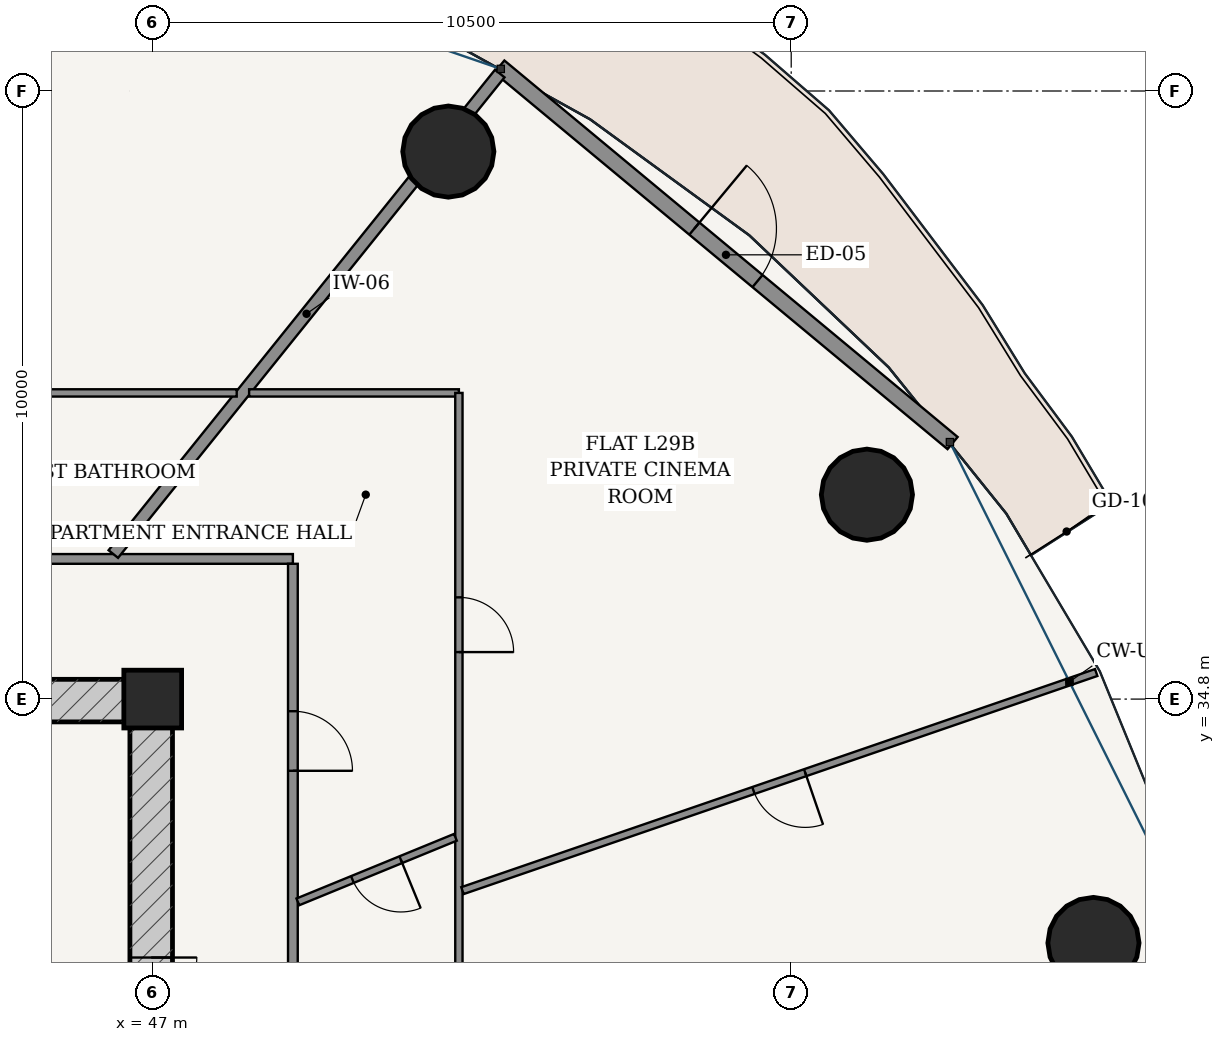
"""IFC4 building model, lengths in metres.
Left out: names, types, materials, properties, quantities, classifications, styles, units other than length and angle.
Written with IfcOpenShell. Run it as: python <this file> out.ifc"""

import sys

from ifc_helpers import new_model, si_unit, direction, frame, frame_2d, origin, origin_2d, place, context, subcontext, project, spatial, rectangle, hollow_circle, extrude, source, transform, mapped, element, fill, save


model = new_model("IFC4")
c1 = context("Model", 3, precision=1e-05, world=origin(), true_north=direction((-0.2419218956, 0.970295726276)))
c2 = subcontext(c1, "Body", "Model", "MODEL_VIEW")
j1 = project(units=[si_unit("LENGTHUNIT", "METRE"), si_unit("PLANEANGLEUNIT", "RADIAN")], contexts=[c1])
p1 = place(None, origin())
s1 = spatial("IfcSite", under=j1, at=p1, CompositionType="ELEMENT")
p2 = place(p1, origin())
s2 = spatial("IfcBuilding", under=s1, at=p2, CompositionType="ELEMENT")
p3 = place(p2, frame((0.0, 0.0, 112.2)))
s3 = spatial("IfcBuildingStorey", under=s2, at=p3, CompositionType="ELEMENT", Elevation=112.2)
p4 = place(p3, frame((47.0, 34.8, 0.0), z_axis=(0.0, 0.0, 1.0), x_axis=(1.0, 0.0, 0.0)))
e1 = element("IfcColumn", 1, at=p4, inside=s3, PredefinedType="COLUMN", context=c2, shape_type="SweptSolid", body=[
    extrude(rectangle(XDim=0.95, YDim=0.95, at=origin_2d()), origin(), (0.0, 0.0, 1.0), 3.6),
])
p5 = place(p3, frame((28.675, 34.775, 0.0), z_axis=(0.0, 0.0, 1.0), x_axis=(1.0, 0.0, 0.0)))
e2 = element("IfcWall", 2, at=p5, inside=s3, PredefinedType="SHEAR", context=c2, shape_type="SweptSolid", body=[
    extrude(rectangle(XDim=18.65, YDim=0.7, at=frame_2d((9.325, 0.0))), origin(), (0.0, 0.0, 1.0), 3.325),
])
p6 = place(p5, frame((6.837, 0.0, 0.0)))
e3 = element("IfcOpeningElement", 3, at=p6, cuts=e2, PredefinedType="OPENING", context=c2, shape_type="SweptSolid", body=[
    extrude(rectangle(XDim=0.85, YDim=2.1, at=frame_2d((0.425, 1.05))), frame((0.0, 0.36, 0.0), z_axis=(0.0, -1.0, 0.0), x_axis=(1.0, 0.0, 0.0)), (0.0, 0.0, 1.0), 0.72),
])
p7 = place(p5, frame((8.895, 0.0, 0.0)))
e4 = element("IfcOpeningElement", 4, at=p7, cuts=e2, PredefinedType="OPENING", context=c2, shape_type="SweptSolid", body=[
    extrude(rectangle(XDim=0.86, YDim=2.1, at=frame_2d((0.43, 1.05))), frame((0.0, 0.36, 0.0), z_axis=(0.0, -1.0, 0.0), x_axis=(1.0, 0.0, 0.0)), (0.0, 0.0, 1.0), 0.72),
])
p8 = place(p5, frame((10.962, 0.0, 0.0)))
e5 = element("IfcOpeningElement", 5, at=p8, cuts=e2, PredefinedType="OPENING", context=c2, shape_type="SweptSolid", body=[
    extrude(rectangle(XDim=0.85, YDim=2.1, at=frame_2d((0.425, 1.05))), frame((0.0, 0.36, 0.0), z_axis=(0.0, -1.0, 0.0), x_axis=(1.0, 0.0, 0.0)), (0.0, 0.0, 1.0), 0.72),
])
p9 = place(p3, frame((46.975, 19.175, 0.0), z_axis=(0.0, 0.0, 1.0), x_axis=(0.0, 1.0, 0.0)))
e6 = element("IfcWall", 6, at=p9, inside=s3, PredefinedType="SHEAR", context=c2, shape_type="SweptSolid", body=[
    extrude(rectangle(XDim=15.25, YDim=0.7, at=frame_2d((7.625, 0.0))), origin(), (0.0, 0.0, 1.0), 3.325),
])
p10 = place(p9, frame((9.875, 0.0, 0.0)))
e7 = element("IfcOpeningElement", 7, at=p10, cuts=e6, PredefinedType="OPENING", context=c2, shape_type="SweptSolid", body=[
    extrude(rectangle(XDim=1.5, YDim=2.2, at=frame_2d((0.75, 1.1))), frame((0.0, 0.36, 0.0), z_axis=(0.0, -1.0, 0.0), x_axis=(1.0, 0.0, 0.0)), (0.0, 0.0, 1.0), 0.72),
])
for number, where, z_axis, x_axis in (
    (8, (62.471, 30.79, 0.0), (0.0, 0.0, 1.0), (1.0, 0.0, 0.0)),
    (9, (58.745, 38.161, 0.0), (0.0, 0.0, 1.0), (1.0, 0.0, 0.0)),
    (10, (51.862, 43.803, 0.0), (0.0, 0.0, 1.0), (1.0, 0.0, 0.0)),
):
    element("IfcColumn", number, at=place(p3, frame(where, z_axis=z_axis, x_axis=x_axis)), inside=s3, PredefinedType="COLUMN", context=c2, shape_type="SweptSolid", body=[
        extrude(hollow_circle(Radius=0.75, WallThickness=0.045, at=origin_2d()), origin(), (0.0, 0.0, 1.0), 3.6),
    ])
p11 = place(p3, frame((60.154, 39.01, 0.0), z_axis=(0.0, 0.0, 1.0), x_axis=(-0.769242574941, 0.638956853706, 0.0)))
e11 = element("IfcWall", 11, at=p11, inside=s3, PredefinedType="SOLIDWALL", context=c2, shape_type="SweptSolid", body=[
    extrude(rectangle(XDim=9.69, YDim=0.26, at=frame_2d((4.845, 0.0))), origin(), (0.0, 0.0, 1.0), 3.325),
])
p12 = place(p11, frame((4.17, 0.0, 0.0)))
e12 = element("IfcOpeningElement", 12, at=p12, cuts=e11, PredefinedType="OPENING", context=c2, shape_type="SweptSolid", body=[
    extrude(rectangle(XDim=1.35, YDim=2.2, at=frame_2d((0.675, 1.1))), frame((0.0, 0.14, 0.0), z_axis=(0.0, -1.0, 0.0), x_axis=(1.0, 0.0, 0.0)), (0.0, 0.0, 1.0), 0.28),
])
p13 = place(p3, frame((26.695, 37.105, 0.0), z_axis=(0.0, 0.0, 1.0), x_axis=(1.0, 0.0, 0.0)))
e13 = element("IfcWall", 13, at=p13, inside=s3, PredefinedType="PARTITIONING", context=c2, shape_type="SweptSolid", body=[
    extrude(rectangle(XDim=22.61, YDim=0.16, at=frame_2d((11.305, 0.0))), origin(), (0.0, 0.0, 1.0), 2.767),
])
p14 = place(p3, frame((49.305, 16.575, 0.0), z_axis=(0.0, 0.0, 1.0), x_axis=(0.0, 1.0, 0.0)))
e14 = element("IfcWall", 14, at=p14, inside=s3, PredefinedType="PARTITIONING", context=c2, shape_type="SweptSolid", body=[
    extrude(rectangle(XDim=20.45, YDim=0.16, at=frame_2d((10.225, 0.0))), origin(), (0.0, 0.0, 1.0), 2.767),
])
p15 = place(p14, frame((17.046, 0.0, 0.0)))
e15 = element("IfcOpeningElement", 15, at=p15, cuts=e14, PredefinedType="OPENING", context=c2, shape_type="SweptSolid", body=[
    extrude(rectangle(XDim=0.98, YDim=2.2, at=frame_2d((0.49, 1.1))), frame((0.0, 0.09, 0.0), z_axis=(0.0, -1.0, 0.0), x_axis=(1.0, 0.0, 0.0)), (0.0, 0.0, 1.0), 0.18),
])
p16 = place(p3, frame((46.352, 37.185, 0.0), z_axis=(0.0, 0.0, 1.0), x_axis=(0.626712884514, 0.779250255299, 0.0)))
e16 = element("IfcWall", 16, at=p16, inside=s3, PredefinedType="PARTITIONING", context=c2, shape_type="SweptSolid", body=[
    extrude(rectangle(XDim=10.141, YDim=0.2, at=frame_2d((5.07, 0.0))), origin(), (0.0, 0.0, 1.0), 2.767),
])
p17 = place(p3, frame((23.965, 39.835, 0.0), z_axis=(0.0, 0.0, 1.0), x_axis=(1.0, 0.0, 0.0)))
e17 = element("IfcWall", 17, at=p17, inside=s3, PredefinedType="PARTITIONING", context=c2, shape_type="SweptSolid", body=[
    extrude(rectangle(XDim=24.416, YDim=0.12, at=frame_2d((12.208, 0.0))), origin(), (0.0, 0.0, 1.0), 2.767),
])
p18 = place(p17, frame((4.192, 0.0, 0.0)))
e18 = element("IfcOpeningElement", 18, at=p18, cuts=e17, PredefinedType="OPENING", context=c2, shape_type="SweptSolid", body=[
    extrude(rectangle(XDim=0.9, YDim=2.15, at=frame_2d((0.45, 1.075))), frame((0.0, 0.07, 0.0), z_axis=(0.0, -1.0, 0.0), x_axis=(1.0, 0.0, 0.0)), (0.0, 0.0, 1.0), 0.14),
])
p19 = place(p17, frame((19.728, 0.0, 0.0)))
e19 = element("IfcOpeningElement", 19, at=p19, cuts=e17, PredefinedType="OPENING", context=c2, shape_type="SweptSolid", body=[
    extrude(rectangle(XDim=0.86, YDim=2.15, at=frame_2d((0.43, 1.075))), frame((0.0, 0.07, 0.0), z_axis=(0.0, -1.0, 0.0), x_axis=(1.0, 0.0, 0.0)), (0.0, 0.0, 1.0), 0.14),
])
p20 = place(p3, frame((48.585, 39.835, 0.0), z_axis=(0.0, 0.0, 1.0), x_axis=(1.0, 0.0, 0.0)))
e20 = element("IfcWall", 20, at=p20, inside=s3, PredefinedType="PARTITIONING", context=c2, shape_type="SweptSolid", body=[
    extrude(rectangle(XDim=3.45, YDim=0.12, at=frame_2d((1.725, 0.0))), origin(), (0.0, 0.0, 1.0), 2.767),
])
p21 = place(p3, frame((52.035, 39.835, 0.0), z_axis=(0.0, 0.0, 1.0), x_axis=(0.0, -1.0, 0.0)))
e21 = element("IfcWall", 21, at=p21, inside=s3, PredefinedType="PARTITIONING", context=c2, shape_type="SweptSolid", body=[
    extrude(rectangle(XDim=26.07, YDim=0.12, at=frame_2d((13.035, 0.0))), origin(), (0.0, 0.0, 1.0), 2.767),
])
p22 = place(p21, frame((3.362, 0.0, 0.0)))
e22 = element("IfcOpeningElement", 22, at=p22, cuts=e21, PredefinedType="OPENING", context=c2, shape_type="SweptSolid", body=[
    extrude(rectangle(XDim=0.9, YDim=2.15, at=frame_2d((0.45, 1.075))), frame((0.0, 0.07, 0.0), z_axis=(0.0, -1.0, 0.0), x_axis=(1.0, 0.0, 0.0)), (0.0, 0.0, 1.0), 0.14),
])
p23 = place(p21, frame((13.924, 0.0, 0.0)))
e23 = element("IfcOpeningElement", 23, at=p23, cuts=e21, PredefinedType="OPENING", context=c2, shape_type="SweptSolid", body=[
    extrude(rectangle(XDim=0.9, YDim=2.15, at=frame_2d((0.45, 1.075))), frame((0.0, 0.07, 0.0), z_axis=(0.0, -1.0, 0.0), x_axis=(1.0, 0.0, 0.0)), (0.0, 0.0, 1.0), 0.14),
])
p24 = place(p3, frame((52.094, 31.65, 0.0), z_axis=(0.0, 0.0, 1.0), x_axis=(0.945573120726, 0.32540970078, 0.0)))
e24 = element("IfcWall", 24, at=p24, inside=s3, PredefinedType="PARTITIONING", context=c2, shape_type="SweptSolid", body=[
    extrude(rectangle(XDim=11.022, YDim=0.12, at=frame_2d((5.511, 0.0))), origin(), (0.0, 0.0, 1.0), 2.767),
])
p25 = place(p24, frame((5.061, 0.0, 0.0)))
e25 = element("IfcOpeningElement", 25, at=p25, cuts=e24, PredefinedType="OPENING", context=c2, shape_type="SweptSolid", body=[
    extrude(rectangle(XDim=0.9, YDim=2.15, at=frame_2d((0.45, 1.075))), frame((0.0, 0.07, 0.0), z_axis=(0.0, -1.0, 0.0), x_axis=(1.0, 0.0, 0.0)), (0.0, 0.0, 1.0), 0.14),
])
p26 = place(p3, frame((49.387, 31.465, 0.0), z_axis=(0.0, 0.0, 1.0), x_axis=(0.925328713836, 0.37916588896, 0.0)))
e26 = element("IfcWall", 26, at=p26, inside=s3, PredefinedType="PARTITIONING", context=c2, shape_type="SweptSolid", body=[
    extrude(rectangle(XDim=2.8, YDim=0.12, at=frame_2d((1.4, 0.0))), origin(), (0.0, 0.0, 1.0), 3.325),
])
p27 = place(p26, frame((0.97, 0.0, 0.0)))
e27 = element("IfcOpeningElement", 27, at=p27, cuts=e26, PredefinedType="OPENING", context=c2, shape_type="SweptSolid", body=[
    extrude(rectangle(XDim=0.86, YDim=2.15, at=frame_2d((0.43, 1.075))), frame((0.0, 0.07, 0.0), z_axis=(0.0, -1.0, 0.0), x_axis=(1.0, 0.0, 0.0)), (0.0, 0.0, 1.0), 0.14),
])
m1 = source(origin(), c2, "Body", "SweptSolid", [
    extrude(rectangle(XDim=1.35, YDim=2.2, at=frame_2d((0.675, 1.1))), frame((0.0, 0.025, 0.0), z_axis=(0.0, -1.0, 0.0), x_axis=(1.0, 0.0, 0.0)), (0.0, 0.0, 1.0), 0.05),
])
p28 = place(p12, frame((1.35, 0.0, 0.0), z_axis=(0.0, 0.0, 1.0), x_axis=(-1.0, 0.0, 0.0)))
e28 = element("IfcDoor", 28, at=p28, inside=s3, OperationType="SINGLE_SWING_LEFT", PredefinedType="DOOR", context=c2, shape_type="MappedRepresentation", body=[
    mapped(m1, transform((0.0, 0.0, 0.0), scale=1.0)),
])
fill(e12, e28)
m2 = source(origin(), c2, "Body", "SweptSolid", [
    extrude(rectangle(XDim=1.5, YDim=2.2, at=frame_2d((0.75, 1.1))), frame((0.0, 0.025, 0.0), z_axis=(0.0, -1.0, 0.0), x_axis=(1.0, 0.0, 0.0)), (0.0, 0.0, 1.0), 0.05),
])
p29 = place(p10, frame((1.5, 0.0, 0.0), z_axis=(0.0, 0.0, 1.0), x_axis=(-1.0, 0.0, 0.0)))
e29 = element("IfcDoor", 29, at=p29, inside=s3, OperationType="DOUBLE_DOOR_SINGLE_SWING", PredefinedType="DOOR", context=c2, shape_type="MappedRepresentation", body=[
    mapped(m2, transform((0.0, 0.0, 0.0), scale=1.0)),
])
fill(e7, e29)
m3 = source(origin(), c2, "Body", "SweptSolid", [
    extrude(rectangle(XDim=0.98, YDim=2.2, at=frame_2d((0.49, 1.1))), frame((0.0, 0.025, 0.0), z_axis=(0.0, -1.0, 0.0), x_axis=(1.0, 0.0, 0.0)), (0.0, 0.0, 1.0), 0.05),
])
p30 = place(p15, frame((0.98, 0.0, 0.0), z_axis=(0.0, 0.0, 1.0), x_axis=(-1.0, 0.0, 0.0)))
e30 = element("IfcDoor", 30, at=p30, inside=s3, OperationType="SINGLE_SWING_RIGHT", PredefinedType="DOOR", context=c2, shape_type="MappedRepresentation", body=[
    mapped(m3, transform((0.0, 0.0, 0.0), scale=1.0)),
])
fill(e15, e30)
m4 = source(origin(), c2, "Body", "SweptSolid", [
    extrude(rectangle(XDim=0.86, YDim=2.15, at=frame_2d((0.43, 1.075))), frame((0.0, 0.025, 0.0), z_axis=(0.0, -1.0, 0.0), x_axis=(1.0, 0.0, 0.0)), (0.0, 0.0, 1.0), 0.05),
])
p31 = place(p27, frame((0.86, 0.0, 0.0), z_axis=(0.0, 0.0, 1.0), x_axis=(-1.0, 0.0, 0.0)))
e31 = element("IfcDoor", 31, at=p31, inside=s3, OperationType="SINGLE_SWING_LEFT", PredefinedType="DOOR", context=c2, shape_type="MappedRepresentation", body=[
    mapped(m4, transform((0.0, 0.0, 0.0), scale=1.0)),
])
fill(e27, e31)
m5 = source(origin(), c2, "Body", "SweptSolid", [
    extrude(rectangle(XDim=0.9, YDim=2.15, at=frame_2d((0.45, 1.075))), frame((0.0, 0.025, 0.0), z_axis=(0.0, -1.0, 0.0), x_axis=(1.0, 0.0, 0.0)), (0.0, 0.0, 1.0), 0.05),
])
p32 = place(p22, origin())
e32 = element("IfcDoor", 32, at=p32, inside=s3, OperationType="SINGLE_SWING_RIGHT", PredefinedType="DOOR", context=c2, shape_type="MappedRepresentation", body=[
    mapped(m5, transform((0.0, 0.0, 0.0), scale=1.0)),
])
fill(e22, e32)
p33 = place(p25, frame((0.9, 0.0, 0.0), z_axis=(0.0, 0.0, 1.0), x_axis=(-1.0, 0.0, 0.0)))
e33 = element("IfcDoor", 33, at=p33, inside=s3, OperationType="SINGLE_SWING_LEFT", PredefinedType="DOOR", context=c2, shape_type="MappedRepresentation", body=[
    mapped(m5, transform((0.0, 0.0, 0.0), scale=1.0)),
])
fill(e25, e33)
save(model, sys.argv[1])
